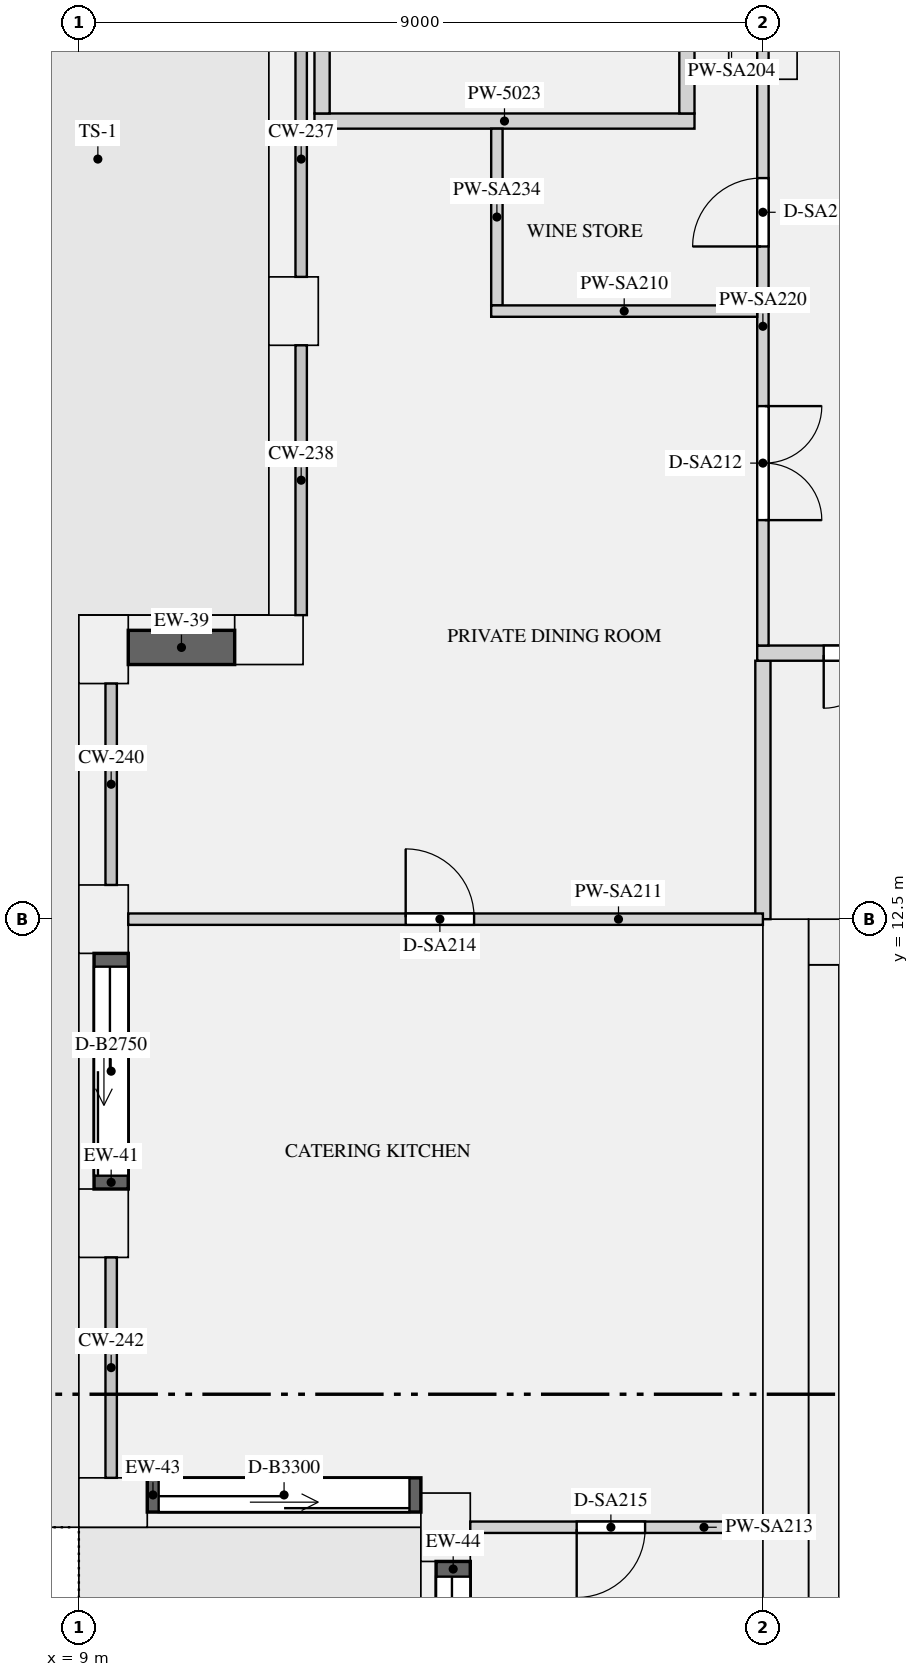
"""IFC4 building model, lengths in metres.
Left out: names, types, materials, properties, quantities, classifications, styles, units other than length and angle.
Written with IfcOpenShell. Run it as: python <this file> out.ifc"""

import sys

from ifc_helpers import new_model, si_unit, direction, frame, frame_2d, origin, origin_2d, place, context, subcontext, project, spatial, rectangle, extrude, element, fill, save


model = new_model("IFC4")
c1 = context("Model", 3, precision=1e-05, world=origin(), true_north=direction((0.0, 1.0)))
c2 = subcontext(c1, "Body", "Model", "MODEL_VIEW")
j1 = project(units=[si_unit("LENGTHUNIT", "METRE"), si_unit("PLANEANGLEUNIT", "RADIAN")], contexts=[c1])
p1 = place(None, origin())
s1 = spatial("IfcSite", under=j1, at=p1, CompositionType="ELEMENT")
p2 = place(p1, origin())
s2 = spatial("IfcBuilding", under=s1, at=p2, CompositionType="ELEMENT")
p3 = place(p2, frame((0.0, 0.0, 191.7)))
s3 = spatial("IfcBuildingStorey", under=s2, at=p3, CompositionType="ELEMENT", Elevation=191.7)
for number, where, z_axis, x_axis in (
    (1, (11.825, 20.5, 0.0), (0.0, 0.0, 1.0), (0.0, -1.0, 0.0)),
    (2, (11.5, 16.175, 0.0), (0.0, 0.0, 1.0), (-1.0, 0.0, 0.0)),
    (3, (9.325, 16.05, 0.0), (0.0, 0.0, 1.0), (0.0, -1.0, 0.0)),
    (4, (9.325, 12.5, 0.0), (0.0, 0.0, 1.0), (0.0, -1.0, 0.0)),
    (5, (9.325, 8.5, 0.0), (0.0, 0.0, 1.0), (0.0, -1.0, 0.0)),
    (6, (9.45, 4.825, 0.0), (0.0, 0.0, 1.0), (1.0, 0.0, 0.0)),
    (7, (13.825, 4.5, 0.0), (0.0, 0.0, 1.0), (0.0, -1.0, 0.0)),
):
    element("IfcColumn", number, at=place(p3, frame(where, z_axis=z_axis, x_axis=x_axis)), inside=s3, PredefinedType="USERDEFINED", context=c2, shape_type="SweptSolid", body=[
        extrude(rectangle(XDim=0.9, YDim=0.65, at=origin_2d()), origin(), (0.0, 0.0, 1.0), 6.3),
    ])
p4 = place(p3, frame((18.0, 24.0, 0.0), z_axis=(0.0, 0.0, 1.0), x_axis=(1.0, 0.0, 0.0)))
e8 = element("IfcColumn", 8, at=p4, inside=s3, PredefinedType="COLUMN", context=c2, shape_type="SweptSolid", body=[
    extrude(rectangle(XDim=0.9, YDim=0.9, at=origin_2d()), origin(), (0.0, 0.0, 1.0), 6.3),
])
p5 = place(p3, frame((18.3, 0.0, 0.0), z_axis=(0.0, 0.0, 1.0), x_axis=(0.0, 1.0, 0.0)))
e9 = element("IfcWall", 9, at=p5, inside=s3, PredefinedType="SHEAR", context=c2, shape_type="SweptSolid", body=[
    extrude(rectangle(XDim=12.5, YDim=0.6, at=frame_2d((6.25, 0.0))), origin(), (0.0, 0.0, 1.0), 6.3),
])
p6 = place(p3, frame((18.6, 12.2, 0.0), z_axis=(0.0, 0.0, 1.0), x_axis=(1.0, 0.0, 0.0)))
e10 = element("IfcWall", 10, at=p6, inside=s3, PredefinedType="SHEAR", context=c2, shape_type="SweptSolid", body=[
    extrude(rectangle(XDim=34.8, YDim=0.6, at=frame_2d((17.4, 0.0))), origin(), (0.0, 0.0, 1.0), 6.3),
])
p7 = place(p6, frame((24.575, 0.0, 0.0)))
e11 = element("IfcOpeningElement", 11, at=p7, cuts=e10, PredefinedType="OPENING", context=c2, shape_type="SweptSolid", body=[
    extrude(rectangle(XDim=1.1, YDim=2.1, at=frame_2d((0.55, 1.05))), frame((0.0, 0.31, 0.0), z_axis=(0.0, -1.0, 0.0), x_axis=(1.0, 0.0, 0.0)), (0.0, 0.0, 1.0), 0.62),
])
p8 = place(p6, frame((26.825, 0.0, 0.0)))
e12 = element("IfcOpeningElement", 12, at=p8, cuts=e10, PredefinedType="OPENING", context=c2, shape_type="SweptSolid", body=[
    extrude(rectangle(XDim=1.1, YDim=2.1, at=frame_2d((0.55, 1.05))), frame((0.0, 0.31, 0.0), z_axis=(0.0, -1.0, 0.0), x_axis=(1.0, 0.0, 0.0)), (0.0, 0.0, 1.0), 0.62),
])
p9 = place(p6, frame((29.075, 0.0, 0.0)))
e13 = element("IfcOpeningElement", 13, at=p9, cuts=e10, PredefinedType="OPENING", context=c2, shape_type="SweptSolid", body=[
    extrude(rectangle(XDim=1.1, YDim=2.1, at=frame_2d((0.55, 1.05))), frame((0.0, 0.31, 0.0), z_axis=(0.0, -1.0, 0.0), x_axis=(1.0, 0.0, 0.0)), (0.0, 0.0, 1.0), 0.62),
])
p10 = place(p6, frame((4.65, 0.0, 0.0)))
e14 = element("IfcOpeningElement", 14, at=p10, cuts=e10, PredefinedType="OPENING", context=c2, shape_type="SweptSolid", body=[
    extrude(rectangle(XDim=0.9, YDim=2.1, at=frame_2d((0.45, 1.05))), frame((0.0, 0.31, 0.0), z_axis=(0.0, -1.0, 0.0), x_axis=(1.0, 0.0, 0.0)), (0.0, 0.0, 1.0), 0.62),
])
p11 = place(p6, frame((1.55, 0.0, 0.0)))
e15 = element("IfcOpeningElement", 15, at=p11, cuts=e10, PredefinedType="OPENING", context=c2, shape_type="SweptSolid", body=[
    extrude(rectangle(XDim=1.2, YDim=2.1, at=frame_2d((0.6, 1.05))), frame((0.0, 0.31, 0.0), z_axis=(0.0, -1.0, 0.0), x_axis=(1.0, 0.0, 0.0)), (0.0, 0.0, 1.0), 0.62),
])
p12 = place(p6, frame((32.05, 0.0, 0.0)))
e16 = element("IfcOpeningElement", 16, at=p12, cuts=e10, PredefinedType="OPENING", context=c2, shape_type="SweptSolid", body=[
    extrude(rectangle(XDim=1.2, YDim=2.1, at=frame_2d((0.6, 1.05))), frame((0.0, 0.31, 0.0), z_axis=(0.0, -1.0, 0.0), x_axis=(1.0, 0.0, 0.0)), (0.0, 0.0, 1.0), 0.62),
])
p13 = place(p3, frame((18.8, 1.0, 0.0), z_axis=(0.0, 0.0, 1.0), x_axis=(0.0, 1.0, 0.0)))
e17 = element("IfcWall", 17, at=p13, inside=s3, PredefinedType="SHEAR", context=c2, shape_type="SweptSolid", body=[
    extrude(rectangle(XDim=10.9, YDim=0.4, at=frame_2d((5.45, 0.0))), origin(), (0.0, 0.0, 1.0), 6.3),
])
p14 = place(p3, frame((11.05, 16.075, 0.9), z_axis=(0.0, 0.0, 1.0), x_axis=(-1.0, 0.0, 0.0)))
e18 = element("IfcWall", 18, at=p14, inside=s3, PredefinedType="SOLIDWALL", context=c2, shape_type="SweptSolid", body=[
    extrude(rectangle(XDim=1.4, YDim=0.45, at=frame_2d((0.7, 0.0))), origin(), (0.0, 0.0, 1.0), 5.08),
])
p15 = place(p3, frame((9.425, 12.05, 0.0), z_axis=(0.0, 0.0, 1.0), x_axis=(0.0, -1.0, 0.0)))
e19 = element("IfcWall", 19, at=p15, inside=s3, PredefinedType="SOLIDWALL", context=c2, shape_type="SweptSolid", body=[
    extrude(rectangle(XDim=3.1, YDim=0.45, at=frame_2d((1.55, 0.0))), origin(), (0.0, 0.0, 1.0), 5.98),
])
p16 = place(p15, frame((0.175, 0.0, 0.0)))
e20 = element("IfcOpeningElement", 20, at=p16, cuts=e19, PredefinedType="OPENING", context=c2, shape_type="SweptSolid", body=[
    extrude(rectangle(XDim=2.75, YDim=2.3, at=frame_2d((1.375, 1.15))), frame((0.0, 0.235, 0.0), z_axis=(0.0, -1.0, 0.0), x_axis=(1.0, 0.0, 0.0)), (0.0, 0.0, 1.0), 0.47),
])
p17 = place(p3, frame((9.9, 4.925, 0.0), z_axis=(0.0, 0.0, 1.0), x_axis=(1.0, 0.0, 0.0)))
e21 = element("IfcWall", 21, at=p17, inside=s3, PredefinedType="SOLIDWALL", context=c2, shape_type="SweptSolid", body=[
    extrude(rectangle(XDim=3.6, YDim=0.45, at=frame_2d((1.8, 0.0))), origin(), (0.0, 0.0, 1.0), 5.98),
])
p18 = place(p17, frame((0.15, 0.0, 0.0)))
e22 = element("IfcOpeningElement", 22, at=p18, cuts=e21, PredefinedType="OPENING", context=c2, shape_type="SweptSolid", body=[
    extrude(rectangle(XDim=3.3, YDim=2.3, at=frame_2d((1.65, 1.15))), frame((0.0, 0.235, 0.0), z_axis=(0.0, -1.0, 0.0), x_axis=(1.0, 0.0, 0.0)), (0.0, 0.0, 1.0), 0.47),
])
p19 = place(p3, frame((13.925, 4.05, 0.0), z_axis=(0.0, 0.0, 1.0), x_axis=(0.0, -1.0, 0.0)))
e23 = element("IfcWall", 23, at=p19, inside=s3, PredefinedType="SOLIDWALL", context=c2, shape_type="SweptSolid", body=[
    extrude(rectangle(XDim=3.4, YDim=0.45, at=frame_2d((1.7, 0.0))), origin(), (0.0, 0.0, 1.0), 5.98),
])
p20 = place(p19, frame((0.2, 0.0, 0.0)))
e24 = element("IfcOpeningElement", 24, at=p20, cuts=e23, PredefinedType="OPENING", context=c2, shape_type="SweptSolid", body=[
    extrude(rectangle(XDim=3.0, YDim=2.3, at=frame_2d((1.5, 1.15))), frame((0.0, 0.235, 0.0), z_axis=(0.0, -1.0, 0.0), x_axis=(1.0, 0.0, 0.0)), (0.0, 0.0, 1.0), 0.47),
])
p21 = place(p3, frame((12.1, 23.0, 0.0), z_axis=(0.0, 0.0, 1.0), x_axis=(1.0, 0.0, 0.0)))
e25 = element("IfcWall", 25, at=p21, inside=s3, PredefinedType="PARTITIONING", context=c2, shape_type="SweptSolid", body=[
    extrude(rectangle(XDim=5.0, YDim=0.2, at=frame_2d((2.5, 0.0))), origin(), (0.0, 0.0, 1.0), 5.98),
])
p22 = place(p3, frame((18.0, 12.5, 0.0), z_axis=(0.0, 0.0, 1.0), x_axis=(0.0, 1.0, 0.0)))
e26 = element("IfcWall", 26, at=p22, inside=s3, PredefinedType="PARTITIONING", context=c2, shape_type="SweptSolid", body=[
    extrude(rectangle(XDim=3.4, YDim=0.2, at=frame_2d((1.7, 0.0))), origin(), (0.0, 0.0, 1.0), 5.98),
])
p23 = place(p3, frame((12.2, 23.1, 0.0), z_axis=(0.0, 0.0, 1.0), x_axis=(0.0, 1.0, 0.0)))
e27 = element("IfcWall", 27, at=p23, inside=s3, PredefinedType="PARTITIONING", context=c2, shape_type="SweptSolid", body=[
    extrude(rectangle(XDim=3.9, YDim=0.2, at=frame_2d((1.95, 0.0))), origin(), (0.0, 0.0, 1.0), 5.98),
])
p24 = place(p3, frame((17.0, 23.1, 0.0), z_axis=(0.0, 0.0, 1.0), x_axis=(0.0, 1.0, 0.0)))
e28 = element("IfcWall", 28, at=p24, inside=s3, PredefinedType="PARTITIONING", context=c2, shape_type="SweptSolid", body=[
    extrude(rectangle(XDim=3.8, YDim=0.2, at=frame_2d((1.9, 0.0))), origin(), (0.0, 0.0, 1.0), 5.98),
])
p25 = place(p24, frame((2.1, 0.0, 0.0)))
e29 = element("IfcOpeningElement", 29, at=p25, cuts=e28, PredefinedType="OPENING", context=c2, shape_type="SweptSolid", body=[
    extrude(rectangle(XDim=1.2, YDim=2.1, at=frame_2d((0.6, 1.05))), frame((0.0, 0.11, 0.0), z_axis=(0.0, -1.0, 0.0), x_axis=(1.0, 0.0, 0.0)), (0.0, 0.0, 1.0), 0.22),
])
p26 = place(p3, frame((14.425, 20.5, 0.0), z_axis=(0.0, 0.0, 1.0), x_axis=(1.0, 0.0, 0.0)))
e30 = element("IfcWall", 30, at=p26, inside=s3, PredefinedType="PARTITIONING", context=c2, shape_type="SweptSolid", body=[
    extrude(rectangle(XDim=3.5, YDim=0.15, at=frame_2d((1.75, 0.0))), origin(), (0.0, 0.0, 1.0), 5.98),
])
p27 = place(p3, frame((9.65, 12.5, 0.0), z_axis=(0.0, 0.0, 1.0), x_axis=(1.0, 0.0, 0.0)))
e31 = element("IfcWall", 31, at=p27, inside=s3, PredefinedType="PARTITIONING", context=c2, shape_type="SweptSolid", body=[
    extrude(rectangle(XDim=8.35, YDim=0.15, at=frame_2d((4.175, 0.0))), origin(), (0.0, 0.0, 1.0), 5.98),
])
p28 = place(p27, frame((3.65, 0.0, 0.0)))
e32 = element("IfcOpeningElement", 32, at=p28, cuts=e31, PredefinedType="OPENING", context=c2, shape_type="SweptSolid", body=[
    extrude(rectangle(XDim=0.9, YDim=2.1, at=frame_2d((0.45, 1.05))), frame((0.0, 0.085, 0.0), z_axis=(0.0, -1.0, 0.0), x_axis=(1.0, 0.0, 0.0)), (0.0, 0.0, 1.0), 0.17),
])
p29 = place(p3, frame((14.15, 4.5, 0.0), z_axis=(0.0, 0.0, 1.0), x_axis=(1.0, 0.0, 0.0)))
e33 = element("IfcWall", 33, at=p29, inside=s3, PredefinedType="PARTITIONING", context=c2, shape_type="SweptSolid", body=[
    extrude(rectangle(XDim=3.85, YDim=0.15, at=frame_2d((1.925, 0.0))), origin(), (0.0, 0.0, 1.0), 5.98),
])
p30 = place(p29, frame((1.4, 0.0, 0.0)))
e34 = element("IfcOpeningElement", 34, at=p30, cuts=e33, PredefinedType="OPENING", context=c2, shape_type="SweptSolid", body=[
    extrude(rectangle(XDim=0.9, YDim=2.1, at=frame_2d((0.45, 1.05))), frame((0.0, 0.085, 0.0), z_axis=(0.0, -1.0, 0.0), x_axis=(1.0, 0.0, 0.0)), (0.0, 0.0, 1.0), 0.17),
])
p31 = place(p3, frame((17.925, 16.0, 0.0), z_axis=(0.0, 0.0, 1.0), x_axis=(1.0, 0.0, 0.0)))
e35 = element("IfcWall", 35, at=p31, inside=s3, PredefinedType="PARTITIONING", context=c2, shape_type="SweptSolid", body=[
    extrude(rectangle(XDim=36.15, YDim=0.2, at=frame_2d((18.075, 0.0))), origin(), (0.0, 0.0, 1.0), 5.98),
])
p32 = place(p31, frame((0.875, 0.0, 0.0)))
e36 = element("IfcOpeningElement", 36, at=p32, cuts=e35, PredefinedType="OPENING", context=c2, shape_type="SweptSolid", body=[
    extrude(rectangle(XDim=1.4, YDim=2.1, at=frame_2d((0.7, 1.05))), frame((0.0, 0.11, 0.0), z_axis=(0.0, -1.0, 0.0), x_axis=(1.0, 0.0, 0.0)), (0.0, 0.0, 1.0), 0.22),
])
p33 = place(p31, frame((33.875, 0.0, 0.0)))
e37 = element("IfcOpeningElement", 37, at=p33, cuts=e35, PredefinedType="OPENING", context=c2, shape_type="SweptSolid", body=[
    extrude(rectangle(XDim=1.4, YDim=2.1, at=frame_2d((0.7, 1.05))), frame((0.0, 0.11, 0.0), z_axis=(0.0, -1.0, 0.0), x_axis=(1.0, 0.0, 0.0)), (0.0, 0.0, 1.0), 0.22),
])
p34 = place(p3, frame((18.0, 16.1, 0.0), z_axis=(0.0, 0.0, 1.0), x_axis=(0.0, 1.0, 0.0)))
e38 = element("IfcWall", 38, at=p34, inside=s3, PredefinedType="PARTITIONING", context=c2, shape_type="SweptSolid", body=[
    extrude(rectangle(XDim=7.825, YDim=0.15, at=frame_2d((3.913, 0.0))), origin(), (0.0, 0.0, 1.0), 5.98),
])
p35 = place(p34, frame((1.65, 0.0, 0.0)))
e39 = element("IfcOpeningElement", 39, at=p35, cuts=e38, PredefinedType="OPENING", context=c2, shape_type="SweptSolid", body=[
    extrude(rectangle(XDim=1.5, YDim=2.1, at=frame_2d((0.75, 1.05))), frame((0.0, 0.085, 0.0), z_axis=(0.0, -1.0, 0.0), x_axis=(1.0, 0.0, 0.0)), (0.0, 0.0, 1.0), 0.17),
])
p36 = place(p34, frame((5.25, 0.0, 0.0)))
e40 = element("IfcOpeningElement", 40, at=p36, cuts=e38, PredefinedType="OPENING", context=c2, shape_type="SweptSolid", body=[
    extrude(rectangle(XDim=0.9, YDim=2.1, at=frame_2d((0.45, 1.05))), frame((0.0, 0.085, 0.0), z_axis=(0.0, -1.0, 0.0), x_axis=(1.0, 0.0, 0.0)), (0.0, 0.0, 1.0), 0.17),
])
p37 = place(p3, frame((14.5, 20.575, 0.0), z_axis=(0.0, 0.0, 1.0), x_axis=(0.0, 1.0, 0.0)))
e41 = element("IfcWall", 41, at=p37, inside=s3, PredefinedType="PARTITIONING", context=c2, shape_type="SweptSolid", body=[
    extrude(rectangle(XDim=2.325, YDim=0.15, at=frame_2d((1.163, 0.0))), origin(), (0.0, 0.0, 1.0), 5.98),
])
p38 = place(p16, origin())
e42 = element("IfcDoor", 42, at=p38, inside=s3, OperationType="SLIDING_TO_LEFT", PredefinedType="DOOR", context=c2, shape_type="SweptSolid", body=[
    extrude(rectangle(XDim=2.75, YDim=2.3, at=frame_2d((1.375, 1.15))), frame((0.0, -0.07, 0.0), z_axis=(0.0, -1.0, 0.0), x_axis=(1.0, 0.0, 0.0)), (0.0, 0.0, 1.0), 0.05),
])
fill(e20, e42)
p39 = place(p18, origin())
e43 = element("IfcDoor", 43, at=p39, inside=s3, OperationType="SLIDING_TO_LEFT", PredefinedType="DOOR", context=c2, shape_type="SweptSolid", body=[
    extrude(rectangle(XDim=3.3, YDim=2.3, at=frame_2d((1.65, 1.15))), frame((0.0, -0.07, 0.0), z_axis=(0.0, -1.0, 0.0), x_axis=(1.0, 0.0, 0.0)), (0.0, 0.0, 1.0), 0.05),
])
fill(e22, e43)
p40 = place(p20, origin())
e44 = element("IfcDoor", 44, at=p40, inside=s3, OperationType="SLIDING_TO_LEFT", PredefinedType="DOOR", context=c2, shape_type="SweptSolid", body=[
    extrude(rectangle(XDim=3.0, YDim=2.3, at=frame_2d((1.5, 1.15))), frame((0.0, -0.07, 0.0), z_axis=(0.0, -1.0, 0.0), x_axis=(1.0, 0.0, 0.0)), (0.0, 0.0, 1.0), 0.05),
])
fill(e24, e44)
p41 = place(p32, frame((1.4, 0.0, 0.0), z_axis=(0.0, 0.0, 1.0), x_axis=(-1.0, 0.0, 0.0)))
e45 = element("IfcDoor", 45, at=p41, inside=s3, OperationType="DOUBLE_DOOR_SINGLE_SWING", PredefinedType="DOOR", context=c2, shape_type="SweptSolid", body=[
    extrude(rectangle(XDim=1.4, YDim=2.1, at=frame_2d((0.7, 1.05))), frame((0.0, 0.025, 0.0), z_axis=(0.0, -1.0, 0.0), x_axis=(1.0, 0.0, 0.0)), (0.0, 0.0, 1.0), 0.05),
])
fill(e36, e45)
p42 = place(p35, frame((1.5, 0.0, 0.0), z_axis=(0.0, 0.0, 1.0), x_axis=(-1.0, 0.0, 0.0)))
e46 = element("IfcDoor", 46, at=p42, inside=s3, OperationType="DOUBLE_DOOR_SINGLE_SWING", PredefinedType="DOOR", context=c2, shape_type="SweptSolid", body=[
    extrude(rectangle(XDim=1.5, YDim=2.1, at=frame_2d((0.75, 1.05))), frame((0.0, 0.025, 0.0), z_axis=(0.0, -1.0, 0.0), x_axis=(1.0, 0.0, 0.0)), (0.0, 0.0, 1.0), 0.05),
])
fill(e39, e46)
p43 = place(p36, origin())
e47 = element("IfcDoor", 47, at=p43, inside=s3, OperationType="SINGLE_SWING_LEFT", PredefinedType="DOOR", context=c2, shape_type="SweptSolid", body=[
    extrude(rectangle(XDim=0.9, YDim=2.1, at=frame_2d((0.45, 1.05))), frame((0.0, 0.025, 0.0), z_axis=(0.0, -1.0, 0.0), x_axis=(1.0, 0.0, 0.0)), (0.0, 0.0, 1.0), 0.05),
])
fill(e40, e47)
p44 = place(p28, origin())
e48 = element("IfcDoor", 48, at=p44, inside=s3, OperationType="SINGLE_SWING_LEFT", PredefinedType="DOOR", context=c2, shape_type="SweptSolid", body=[
    extrude(rectangle(XDim=0.9, YDim=2.1, at=frame_2d((0.45, 1.05))), frame((0.0, 0.025, 0.0), z_axis=(0.0, -1.0, 0.0), x_axis=(1.0, 0.0, 0.0)), (0.0, 0.0, 1.0), 0.05),
])
fill(e32, e48)
p45 = place(p30, frame((0.9, 0.0, 0.0), z_axis=(0.0, 0.0, 1.0), x_axis=(-1.0, 0.0, 0.0)))
e49 = element("IfcDoor", 49, at=p45, inside=s3, OperationType="SINGLE_SWING_RIGHT", PredefinedType="DOOR", context=c2, shape_type="SweptSolid", body=[
    extrude(rectangle(XDim=0.9, YDim=2.1, at=frame_2d((0.45, 1.05))), frame((0.0, 0.025, 0.0), z_axis=(0.0, -1.0, 0.0), x_axis=(1.0, 0.0, 0.0)), (0.0, 0.0, 1.0), 0.05),
])
fill(e34, e49)
save(model, sys.argv[1])
